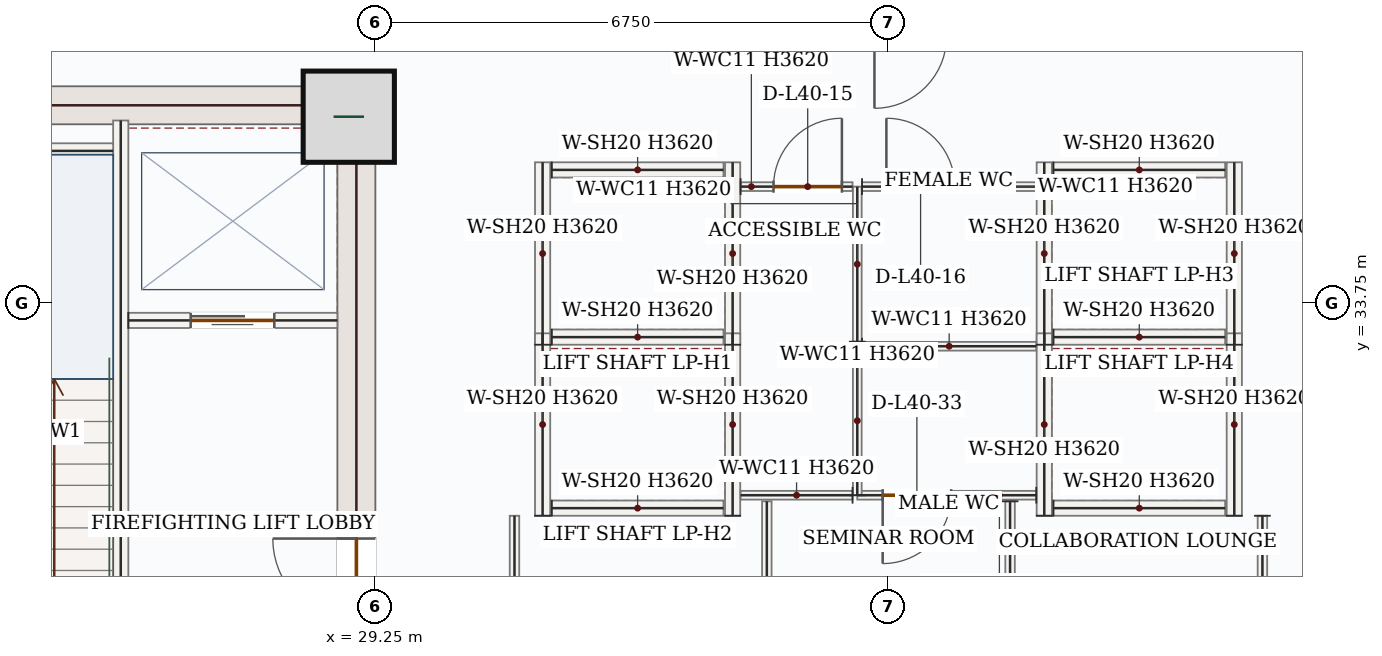
"""IFC4 building model, lengths in metres.
Left out: names, types, materials, properties, quantities, classifications, styles, units other than length and angle.
Written with IfcOpenShell. Run it as: python <this file> out.ifc"""

import sys

from ifc_helpers import new_model, si_unit, direction, frame, frame_2d, origin, origin_2d, place, context, subcontext, project, spatial, rectangle, extrude, source, transform, mapped, element, fill, save


model = new_model("IFC4")
c1 = context("Model", 3, precision=1e-05, world=origin(), true_north=direction((0.0, 1.0)))
c2 = subcontext(c1, "Body", "Model", "MODEL_VIEW")
j1 = project(units=[si_unit("LENGTHUNIT", "METRE"), si_unit("PLANEANGLEUNIT", "RADIAN")], contexts=[c1])
p1 = place(None, origin())
s1 = spatial("IfcSite", under=j1, at=p1, CompositionType="ELEMENT")
p2 = place(p1, origin())
s2 = spatial("IfcBuilding", under=s1, at=p2, CompositionType="ELEMENT")
p3 = place(p2, frame((0.0, 0.0, 174.6)))
s3 = spatial("IfcBuildingStorey", under=s2, at=p3, CompositionType="ELEMENT", Elevation=174.6)
p4 = place(p3, frame((29.0, 28.05, 0.0), z_axis=(0.0, 0.0, 1.0), x_axis=(0.0, 1.0, 0.0)))
e1 = element("IfcWall", 1, at=p4, inside=s3, PredefinedType="SHEAR", context=c2, shape_type="SweptSolid", body=[
    extrude(rectangle(XDim=8.55, YDim=0.5, at=frame_2d((4.275, 0.0))), origin(), (0.0, 0.0, 1.0), 3.62),
])
p5 = place(p4, frame((1.5, 0.0, 0.0)))
e2 = element("IfcOpeningElement", 2, at=p5, cuts=e1, PredefinedType="OPENING", context=c2, shape_type="SweptSolid", body=[
    extrude(rectangle(XDim=1.1, YDim=2.2, at=frame_2d((0.55, 1.1))), frame((0.0, 0.26, 0.0), z_axis=(0.0, -1.0, 0.0), x_axis=(1.0, 0.0, 0.0)), (0.0, 0.0, 1.0), 0.52),
])
m1 = source(origin(), c2, "Body", "SweptSolid", [
    extrude(rectangle(XDim=7.0, YDim=0.5, at=frame_2d((3.5, 0.0))), origin(), (0.0, 0.0, 1.0), 3.62),
])
p6 = place(p3, frame((21.75, 36.35, 0.0), z_axis=(0.0, 0.0, 1.0), x_axis=(1.0, 0.0, 0.0)))
e3 = element("IfcWall", 3, at=p6, inside=s3, PredefinedType="SHEAR", context=c2, shape_type="MappedRepresentation", body=[
    mapped(m1, transform((0.0, 0.0, 0.0), x_axis=(1.0, 0.0, 0.0), y_axis=(0.0, 1.0, 0.0), z_axis=(0.0, 0.0, 1.0), scale=1.0)),
])
m2 = source(origin(), c2, "Body", "SweptSolid", [
    extrude(rectangle(XDim=1.2, YDim=1.2, at=origin_2d()), origin(), (0.0, 0.0, 1.0), 3.9),
])
p7 = place(p3, frame((28.9, 36.2, 0.0), z_axis=(0.0, 0.0, 1.0), x_axis=(1.0, 0.0, 0.0)))
e4 = element("IfcColumn", 4, at=p7, inside=s3, PredefinedType="COLUMN", context=c2, shape_type="MappedRepresentation", body=[
    mapped(m2, transform((0.0, 0.0, 0.0), x_axis=(1.0, 0.0, 0.0), y_axis=(0.0, 1.0, 0.0), z_axis=(0.0, 0.0, 1.0), scale=1.0)),
])
p8 = place(p3, frame((25.9, 28.15, 0.0), z_axis=(0.0, 0.0, 1.0), x_axis=(0.0, 1.0, 0.0)))
e5 = element("IfcWall", 5, at=p8, inside=s3, PredefinedType="SOLIDWALL", context=c2, shape_type="SweptSolid", body=[
    extrude(rectangle(XDim=8.0, YDim=0.2, at=frame_2d((4.0, 0.0))), origin(), (0.0, 0.0, 1.0), 3.62),
])
p9 = place(p8, frame((0.4, 0.0, 0.0)))
e6 = element("IfcOpeningElement", 6, at=p9, cuts=e5, PredefinedType="OPENING", context=c2, shape_type="SweptSolid", body=[
    extrude(rectangle(XDim=1.05, YDim=2.15, at=frame_2d((0.525, 1.075))), frame((0.0, 0.11, 0.0), z_axis=(0.0, -1.0, 0.0), x_axis=(1.0, 0.0, 0.0)), (0.0, 0.0, 1.0), 0.22),
])
m3 = source(origin(), c2, "Body", "SweptSolid", [
    extrude(rectangle(XDim=3.25, YDim=0.2, at=frame_2d((1.625, 0.0))), origin(), (0.0, 0.0, 1.0), 3.62),
])
p10 = place(p3, frame((22.55, 35.75, 0.0), z_axis=(0.0, 0.0, 1.0), x_axis=(1.0, 0.0, 0.0)))
e7 = element("IfcWall", 7, at=p10, inside=s3, PredefinedType="SOLIDWALL", context=c2, shape_type="MappedRepresentation", body=[
    mapped(m3, transform((0.0, 0.0, 0.0), x_axis=(1.0, 0.0, 0.0), y_axis=(0.0, 1.0, 0.0), z_axis=(0.0, 0.0, 1.0), scale=1.0)),
])
p11 = place(p3, frame((26.0, 33.52, 0.0), z_axis=(0.0, 0.0, 1.0), x_axis=(1.0, 0.0, 0.0)))
e8 = element("IfcWall", 8, at=p11, inside=s3, PredefinedType="SOLIDWALL", context=c2, shape_type="SweptSolid", body=[
    extrude(rectangle(XDim=2.75, YDim=0.2, at=frame_2d((1.375, 0.0))), origin(), (0.0, 0.0, 1.0), 3.62),
])
p12 = place(p11, frame((0.82, 0.0, 0.0)))
e9 = element("IfcOpeningElement", 9, at=p12, cuts=e8, PredefinedType="OPENING", context=c2, shape_type="SweptSolid", body=[
    extrude(rectangle(XDim=1.1, YDim=2.15, at=frame_2d((0.55, 1.075))), frame((0.0, 0.11, 0.0), z_axis=(0.0, -1.0, 0.0), x_axis=(1.0, 0.0, 0.0)), (0.0, 0.0, 1.0), 0.22),
])
m4 = source(origin(), c2, "Body", "SweptSolid", [
    extrude(rectangle(XDim=2.4, YDim=0.2, at=frame_2d((1.2, 0.0))), origin(), (0.0, 0.0, 1.0), 3.62),
])
for number, where, z_axis, x_axis in (
    (10, (31.45, 33.2, 0.0), (0.0, 0.0, 1.0), (0.0, 1.0, 0.0)),
    (11, (33.95, 33.2, 0.0), (0.0, 0.0, 1.0), (0.0, 1.0, 0.0)),
):
    element("IfcWall", number, at=place(p3, frame(where, z_axis=z_axis, x_axis=x_axis)), inside=s3, PredefinedType="SOLIDWALL", context=c2, shape_type="MappedRepresentation", body=[
        mapped(m4, transform((0.0, 0.0, 0.0), x_axis=(1.0, 0.0, 0.0), y_axis=(0.0, 1.0, 0.0), z_axis=(0.0, 0.0, 1.0), scale=1.0)),
    ])
m5 = source(origin(), c2, "Body", "SweptSolid", [
    extrude(rectangle(XDim=2.26, YDim=0.2, at=frame_2d((1.13, 0.0))), origin(), (0.0, 0.0, 1.0), 3.62),
])
for number, where, z_axis, x_axis in (
    (12, (31.57, 33.3, 0.0), (0.0, 0.0, 1.0), (1.0, 0.0, 0.0)),
    (13, (31.57, 35.5, 0.0), (0.0, 0.0, 1.0), (1.0, 0.0, 0.0)),
):
    element("IfcWall", number, at=place(p3, frame(where, z_axis=z_axis, x_axis=x_axis)), inside=s3, PredefinedType="SOLIDWALL", context=c2, shape_type="MappedRepresentation", body=[
        mapped(m5, transform((0.0, 0.0, 0.0), x_axis=(1.0, 0.0, 0.0), y_axis=(0.0, 1.0, 0.0), z_axis=(0.0, 0.0, 1.0), scale=1.0)),
    ])
for number, where, z_axis, x_axis in (
    (14, (31.45, 30.95, 0.0), (0.0, 0.0, 1.0), (0.0, 1.0, 0.0)),
    (15, (33.95, 30.95, 0.0), (0.0, 0.0, 1.0), (0.0, 1.0, 0.0)),
):
    element("IfcWall", number, at=place(p3, frame(where, z_axis=z_axis, x_axis=x_axis)), inside=s3, PredefinedType="SOLIDWALL", context=c2, shape_type="MappedRepresentation", body=[
        mapped(m4, transform((0.0, 0.0, 0.0), x_axis=(1.0, 0.0, 0.0), y_axis=(0.0, 1.0, 0.0), z_axis=(0.0, 0.0, 1.0), scale=1.0)),
    ])
p13 = place(p3, frame((31.57, 31.05, 0.0), z_axis=(0.0, 0.0, 1.0), x_axis=(1.0, 0.0, 0.0)))
e16 = element("IfcWall", 16, at=p13, inside=s3, PredefinedType="SOLIDWALL", context=c2, shape_type="MappedRepresentation", body=[
    mapped(m5, transform((0.0, 0.0, 0.0), x_axis=(1.0, 0.0, 0.0), y_axis=(0.0, 1.0, 0.0), z_axis=(0.0, 0.0, 1.0), scale=1.0)),
])
for number, where, z_axis, x_axis in (
    (17, (38.05, 33.2, 0.0), (0.0, 0.0, 1.0), (0.0, 1.0, 0.0)),
    (18, (40.55, 33.2, 0.0), (0.0, 0.0, 1.0), (0.0, 1.0, 0.0)),
):
    element("IfcWall", number, at=place(p3, frame(where, z_axis=z_axis, x_axis=x_axis)), inside=s3, PredefinedType="SOLIDWALL", context=c2, shape_type="MappedRepresentation", body=[
        mapped(m4, transform((0.0, 0.0, 0.0), x_axis=(1.0, 0.0, 0.0), y_axis=(0.0, 1.0, 0.0), z_axis=(0.0, 0.0, 1.0), scale=1.0)),
    ])
for number, where, z_axis, x_axis in (
    (19, (38.17, 33.3, 0.0), (0.0, 0.0, 1.0), (1.0, 0.0, 0.0)),
    (20, (38.17, 35.5, 0.0), (0.0, 0.0, 1.0), (1.0, 0.0, 0.0)),
):
    element("IfcWall", number, at=place(p3, frame(where, z_axis=z_axis, x_axis=x_axis)), inside=s3, PredefinedType="SOLIDWALL", context=c2, shape_type="MappedRepresentation", body=[
        mapped(m5, transform((0.0, 0.0, 0.0), x_axis=(1.0, 0.0, 0.0), y_axis=(0.0, 1.0, 0.0), z_axis=(0.0, 0.0, 1.0), scale=1.0)),
    ])
for number, where, z_axis, x_axis in (
    (21, (38.05, 30.95, 0.0), (0.0, 0.0, 1.0), (0.0, 1.0, 0.0)),
    (22, (40.55, 30.95, 0.0), (0.0, 0.0, 1.0), (0.0, 1.0, 0.0)),
):
    element("IfcWall", number, at=place(p3, frame(where, z_axis=z_axis, x_axis=x_axis)), inside=s3, PredefinedType="SOLIDWALL", context=c2, shape_type="MappedRepresentation", body=[
        mapped(m4, transform((0.0, 0.0, 0.0), x_axis=(1.0, 0.0, 0.0), y_axis=(0.0, 1.0, 0.0), z_axis=(0.0, 0.0, 1.0), scale=1.0)),
    ])
p14 = place(p3, frame((38.17, 31.05, 0.0), z_axis=(0.0, 0.0, 1.0), x_axis=(1.0, 0.0, 0.0)))
e23 = element("IfcWall", 23, at=p14, inside=s3, PredefinedType="SOLIDWALL", context=c2, shape_type="MappedRepresentation", body=[
    mapped(m5, transform((0.0, 0.0, 0.0), x_axis=(1.0, 0.0, 0.0), y_axis=(0.0, 1.0, 0.0), z_axis=(0.0, 0.0, 1.0), scale=1.0)),
])
p15 = place(p3, frame((37.945, 31.22, 0.0), z_axis=(0.0, 0.0, 1.0), x_axis=(-1.0, 0.0, 0.0)))
e24 = element("IfcWall", 24, at=p15, inside=s3, PredefinedType="PARTITIONING", context=c2, shape_type="SweptSolid", body=[
    extrude(rectangle(XDim=2.355, YDim=0.115, at=frame_2d((1.177, 0.0))), origin(), (0.0, 0.0, 1.0), 3.62),
])
p16 = place(p15, frame((1.121, 0.0, 0.0)))
e25 = element("IfcOpeningElement", 25, at=p16, cuts=e24, PredefinedType="OPENING", context=c2, shape_type="SweptSolid", body=[
    extrude(rectangle(XDim=0.9, YDim=2.1, at=frame_2d((0.45, 1.05))), frame((0.0, 0.067, 0.0), z_axis=(0.0, -1.0, 0.0), x_axis=(1.0, 0.0, 0.0)), (0.0, 0.0, 1.0), 0.135),
])
m6 = source(origin(), c2, "Body", "SweptSolid", [
    extrude(rectangle(XDim=1.96, YDim=0.115, at=frame_2d((0.98, 0.0))), origin(), (0.0, 0.0, 1.0), 3.62),
])
p17 = place(p3, frame((35.59, 31.22, 0.0), z_axis=(0.0, 0.0, 1.0), x_axis=(0.0, 1.0, 0.0)))
e26 = element("IfcWall", 26, at=p17, inside=s3, PredefinedType="PARTITIONING", context=c2, shape_type="MappedRepresentation", body=[
    mapped(m6, transform((0.0, 0.0, 0.0), x_axis=(1.0, 0.0, 0.0), y_axis=(0.0, 1.0, 0.0), z_axis=(0.0, 0.0, 1.0), scale=1.0)),
])
m7 = source(origin(), c2, "Body", "SweptSolid", [
    extrude(rectangle(XDim=2.292, YDim=0.115, at=frame_2d((1.146, 0.0))), origin(), (0.0, 0.0, 1.0), 3.62),
])
p18 = place(p3, frame((35.653, 33.18, 0.0), z_axis=(0.0, 0.0, 1.0), x_axis=(1.0, 0.0, 0.0)))
e27 = element("IfcWall", 27, at=p18, inside=s3, PredefinedType="PARTITIONING", context=c2, shape_type="MappedRepresentation", body=[
    mapped(m7, transform((0.0, 0.0, 0.0), x_axis=(1.0, 0.0, 0.0), y_axis=(0.0, 1.0, 0.0), z_axis=(0.0, 0.0, 1.0), scale=1.0)),
])
m8 = source(origin(), c2, "Body", "SweptSolid", [
    extrude(rectangle(XDim=2.04, YDim=0.115, at=frame_2d((1.02, 0.0))), origin(), (0.0, 0.0, 1.0), 3.62),
])
p19 = place(p3, frame((35.59, 33.24, 0.0), z_axis=(0.0, 0.0, 1.0), x_axis=(0.0, 1.0, 0.0)))
e28 = element("IfcWall", 28, at=p19, inside=s3, PredefinedType="PARTITIONING", context=c2, shape_type="MappedRepresentation", body=[
    mapped(m8, transform((0.0, 0.0, 0.0), x_axis=(1.0, 0.0, 0.0), y_axis=(0.0, 1.0, 0.0), z_axis=(0.0, 0.0, 1.0), scale=1.0)),
])
p20 = place(p3, frame((35.653, 35.28, 0.0), z_axis=(0.0, 0.0, 1.0), x_axis=(1.0, 0.0, 0.0)))
e29 = element("IfcWall", 29, at=p20, inside=s3, PredefinedType="PARTITIONING", context=c2, shape_type="SweptSolid", body=[
    extrude(rectangle(XDim=2.292, YDim=0.115, at=frame_2d((1.146, 0.0))), origin(), (0.0, 0.0, 1.0), 3.62),
])
p21 = place(p20, frame((0.32, 0.0, 0.0)))
e30 = element("IfcOpeningElement", 30, at=p21, cuts=e29, PredefinedType="OPENING", context=c2, shape_type="SweptSolid", body=[
    extrude(rectangle(XDim=0.9, YDim=2.1, at=frame_2d((0.45, 1.05))), frame((0.0, 0.067, 0.0), z_axis=(0.0, -1.0, 0.0), x_axis=(1.0, 0.0, 0.0)), (0.0, 0.0, 1.0), 0.135),
])
m9 = source(origin(), c2, "Body", "SweptSolid", [
    extrude(rectangle(XDim=1.473, YDim=0.115, at=frame_2d((0.736, 0.0))), origin(), (0.0, 0.0, 1.0), 3.62),
])
p22 = place(p3, frame((35.528, 31.22, 0.0), z_axis=(0.0, 0.0, 1.0), x_axis=(-1.0, 0.0, 0.0)))
e31 = element("IfcWall", 31, at=p22, inside=s3, PredefinedType="PARTITIONING", context=c2, shape_type="MappedRepresentation", body=[
    mapped(m9, transform((0.0, 0.0, 0.0), x_axis=(1.0, 0.0, 0.0), y_axis=(0.0, 1.0, 0.0), z_axis=(0.0, 0.0, 1.0), scale=1.0)),
])
p23 = place(p3, frame((34.055, 35.28, 0.0), z_axis=(0.0, 0.0, 1.0), x_axis=(1.0, 0.0, 0.0)))
e32 = element("IfcWall", 32, at=p23, inside=s3, PredefinedType="PARTITIONING", context=c2, shape_type="SweptSolid", body=[
    extrude(rectangle(XDim=1.473, YDim=0.115, at=frame_2d((0.736, 0.0))), origin(), (0.0, 0.0, 1.0), 3.62),
])
p24 = place(p23, frame((0.433, 0.0, 0.0)))
e33 = element("IfcOpeningElement", 33, at=p24, cuts=e32, PredefinedType="OPENING", context=c2, shape_type="SweptSolid", body=[
    extrude(rectangle(XDim=0.9, YDim=2.1, at=frame_2d((0.45, 1.05))), frame((0.0, 0.067, 0.0), z_axis=(0.0, -1.0, 0.0), x_axis=(1.0, 0.0, 0.0)), (0.0, 0.0, 1.0), 0.135),
])
m10 = source(origin(), c2, "Body", "SweptSolid", [
    extrude(rectangle(XDim=3.2, YDim=0.125, at=frame_2d((1.6, 0.0))), origin(), (0.0, 0.0, 1.0), 3.62),
])
for number, where, z_axis, x_axis in (
    (34, (34.4, 27.94, 0.0), (0.0, 0.0, 1.0), (0.0, 1.0, 0.0)),
    (35, (37.6, 31.14, 0.0), (0.0, 0.0, 1.0), (0.0, -1.0, 0.0)),
):
    element("IfcWall", number, at=place(p3, frame(where, z_axis=z_axis, x_axis=x_axis)), inside=s3, PredefinedType="PARTITIONING", context=c2, shape_type="MappedRepresentation", body=[
        mapped(m10, transform((0.0, 0.0, 0.0), x_axis=(1.0, 0.0, 0.0), y_axis=(0.0, 1.0, 0.0), z_axis=(0.0, 0.0, 1.0), scale=1.0)),
    ])
m11 = source(origin(), c2, "Body", "SweptSolid", [
    extrude(rectangle(XDim=2.942, YDim=0.125, at=frame_2d((1.471, 0.0))), origin(), (0.0, 0.0, 1.0), 3.62),
])
p25 = place(p3, frame((31.08, 28.008, 0.0), z_axis=(0.0, 0.0, 1.0), x_axis=(0.0, 1.0, 0.0)))
e36 = element("IfcWall", 36, at=p25, inside=s3, PredefinedType="PARTITIONING", context=c2, shape_type="MappedRepresentation", body=[
    mapped(m11, transform((0.0, 0.0, 0.0), x_axis=(1.0, 0.0, 0.0), y_axis=(0.0, 1.0, 0.0), z_axis=(0.0, 0.0, 1.0), scale=1.0)),
])
m12 = source(origin(), c2, "Body", "SweptSolid", [
    extrude(rectangle(XDim=3.01, YDim=0.125, at=frame_2d((1.505, 0.0))), origin(), (0.0, 0.0, 1.0), 3.62),
])
p26 = place(p3, frame((40.92, 30.95, 0.0), z_axis=(0.0, 0.0, 1.0), x_axis=(0.0, -1.0, 0.0)))
e37 = element("IfcWall", 37, at=p26, inside=s3, PredefinedType="PARTITIONING", context=c2, shape_type="MappedRepresentation", body=[
    mapped(m12, transform((0.0, 0.0, 0.0), x_axis=(1.0, 0.0, 0.0), y_axis=(0.0, 1.0, 0.0), z_axis=(0.0, 0.0, 1.0), scale=1.0)),
])
m13 = source(origin(), c2, "Body", "SweptSolid", [
    extrude(rectangle(XDim=1.1, YDim=2.15, at=frame_2d((0.55, 1.075))), frame((0.0, 0.025, 0.0), z_axis=(0.0, -1.0, 0.0), x_axis=(1.0, 0.0, 0.0)), (0.0, 0.0, 1.0), 0.05),
])
p27 = place(p12, origin())
e38 = element("IfcDoor", 38, at=p27, inside=s3, OperationType="DOUBLE_DOOR_SLIDING", PredefinedType="DOOR", context=c2, shape_type="MappedRepresentation", body=[
    mapped(m13, transform((0.0, 0.0, 0.0), x_axis=(1.0, 0.0, 0.0), y_axis=(0.0, 1.0, 0.0), z_axis=(0.0, 0.0, 1.0), scale=1.0)),
])
fill(e9, e38)
m14 = source(origin(), c2, "Body", "SweptSolid", [
    extrude(rectangle(XDim=1.1, YDim=2.2, at=frame_2d((0.55, 1.1))), frame((0.0, 0.025, 0.0), z_axis=(0.0, -1.0, 0.0), x_axis=(1.0, 0.0, 0.0)), (0.0, 0.0, 1.0), 0.05),
])
p28 = place(p5, origin())
e39 = element("IfcDoor", 39, at=p28, inside=s3, OperationType="SINGLE_SWING_RIGHT", PredefinedType="DOOR", context=c2, shape_type="MappedRepresentation", body=[
    mapped(m14, transform((0.0, 0.0, 0.0), x_axis=(1.0, 0.0, 0.0), y_axis=(0.0, 1.0, 0.0), z_axis=(0.0, 0.0, 1.0), scale=1.0)),
])
fill(e2, e39)
m15 = source(origin(), c2, "Body", "SweptSolid", [
    extrude(rectangle(XDim=0.9, YDim=2.1, at=frame_2d((0.45, 1.05))), frame((0.0, 0.025, 0.0), z_axis=(0.0, -1.0, 0.0), x_axis=(1.0, 0.0, 0.0)), (0.0, 0.0, 1.0), 0.05),
])
p29 = place(p24, origin())
e40 = element("IfcDoor", 40, at=p29, inside=s3, OperationType="SINGLE_SWING_RIGHT", PredefinedType="DOOR", context=c2, shape_type="MappedRepresentation", body=[
    mapped(m15, transform((0.0, 0.0, 0.0), x_axis=(1.0, 0.0, 0.0), y_axis=(0.0, 1.0, 0.0), z_axis=(0.0, 0.0, 1.0), scale=1.0)),
])
fill(e33, e40)
p30 = place(p21, origin())
e41 = element("IfcDoor", 41, at=p30, inside=s3, OperationType="SINGLE_SWING_LEFT", PredefinedType="DOOR", context=c2, shape_type="MappedRepresentation", body=[
    mapped(m15, transform((0.0, 0.0, 0.0), x_axis=(1.0, 0.0, 0.0), y_axis=(0.0, 1.0, 0.0), z_axis=(0.0, 0.0, 1.0), scale=1.0)),
])
fill(e30, e41)
p31 = place(p16, origin())
e42 = element("IfcDoor", 42, at=p31, inside=s3, OperationType="SINGLE_SWING_RIGHT", PredefinedType="DOOR", context=c2, shape_type="MappedRepresentation", body=[
    mapped(m15, transform((0.0, 0.0, 0.0), x_axis=(1.0, 0.0, 0.0), y_axis=(0.0, 1.0, 0.0), z_axis=(0.0, 0.0, 1.0), scale=1.0)),
])
fill(e25, e42)
save(model, sys.argv[1])
